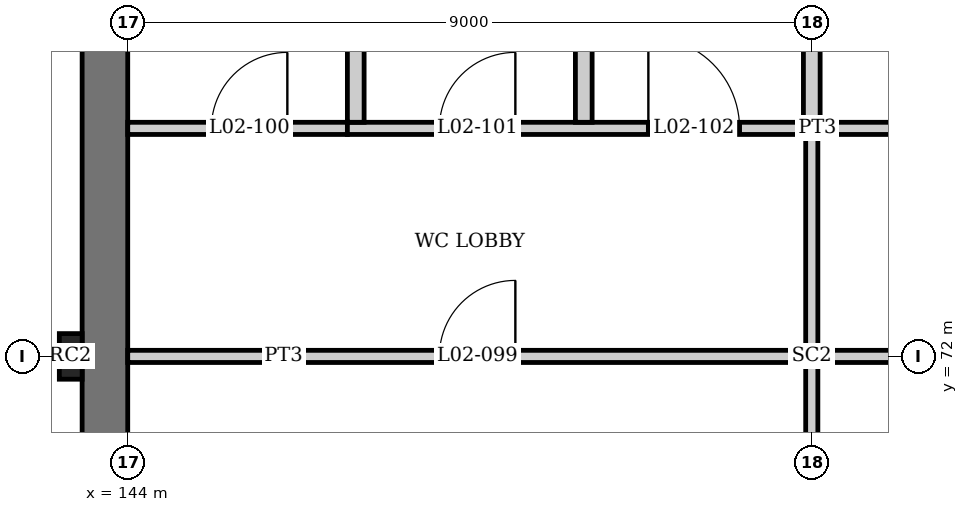
"""IFC4 building model, lengths in metres.
Left out: names, types, materials, properties, quantities, classifications, styles, units other than length and angle.
Written with IfcOpenShell. Run it as: python <this file> out.ifc"""

import sys

from ifc_helpers import new_model, si_unit, direction, frame, frame_2d, origin, origin_2d, place, context, subcontext, project, spatial, rectangle, i_section, extrude, element, fill, save


model = new_model("IFC4")
c1 = context("Model", 3, precision=1e-05, world=origin(), true_north=direction((0.0, 1.0)))
c2 = subcontext(c1, "Body", "Model", "MODEL_VIEW")
j1 = project(units=[si_unit("LENGTHUNIT", "METRE"), si_unit("PLANEANGLEUNIT", "RADIAN")], contexts=[c1])
p1 = place(None, origin())
s1 = spatial("IfcSite", under=j1, at=p1, CompositionType="ELEMENT")
p2 = place(p1, origin())
s2 = spatial("IfcBuilding", under=s1, at=p2, CompositionType="ELEMENT")
p3 = place(p2, frame((0.0, 0.0, 10.5)))
s3 = spatial("IfcBuildingStorey", under=s2, at=p3, CompositionType="ELEMENT", Elevation=10.5)
p4 = place(p3, frame((153.0, 72.0, 0.0), z_axis=(0.0, 0.0, 1.0), x_axis=(0.0, 1.0, 0.0)))
e1 = element("IfcColumn", 1, at=p4, inside=s3, PredefinedType="COLUMN", context=c2, shape_type="SweptSolid", body=[
    extrude(i_section(OverallWidth=0.256, OverallDepth=0.26, WebThickness=0.01, FlangeThickness=0.017, at=origin_2d()), origin(), (0.0, 0.0, 1.0), 4.5),
])
p5 = place(p3, frame((143.7, 54.0, 0.0), z_axis=(0.0, 0.0, 1.0), x_axis=(0.0, 1.0, 0.0)))
e2 = element("IfcWall", 2, at=p5, inside=s3, PredefinedType="SHEAR", context=c2, shape_type="SweptSolid", body=[
    extrude(rectangle(XDim=26.4, YDim=0.6, at=frame_2d((13.2, 0.0))), origin(), (0.0, 0.0, 1.0), 4.5),
])
p6 = place(p3, frame((143.25, 72.0, 0.0), z_axis=(0.0, 0.0, 1.0), x_axis=(0.0, 1.0, 0.0)))
e3 = element("IfcColumn", 3, at=p6, inside=s3, PredefinedType="PILASTER", context=c2, shape_type="SweptSolid", body=[
    extrude(rectangle(XDim=0.6, YDim=0.3, at=origin_2d()), origin(), (0.0, 0.0, 1.0), 4.5),
])
p7 = place(p3, frame((144.0, 72.0, 0.0), z_axis=(0.0, 0.0, 1.0), x_axis=(1.0, 0.0, 0.0)))
e4 = element("IfcWall", 4, at=p7, inside=s3, PredefinedType="PARTITIONING", context=c2, shape_type="SweptSolid", body=[
    extrude(rectangle(XDim=8.87, YDim=0.16, at=frame_2d((4.435, 0.0))), origin(), (0.0, 0.0, 1.0), 3.738),
])
p8 = place(p7, frame((4.1, 0.0, 0.0)))
e5 = element("IfcOpeningElement", 5, at=p8, cuts=e4, PredefinedType="OPENING", context=c2, shape_type="SweptSolid", body=[
    extrude(rectangle(XDim=1.0, YDim=2.1, at=frame_2d((0.5, 1.05))), frame((0.0, 0.09, 0.0), z_axis=(0.0, -1.0, 0.0), x_axis=(1.0, 0.0, 0.0)), (0.0, 0.0, 1.0), 0.18),
])
p9 = place(p3, frame((153.13, 72.0, 0.0), z_axis=(0.0, 0.0, 1.0), x_axis=(1.0, 0.0, 0.0)))
e6 = element("IfcWall", 6, at=p9, inside=s3, PredefinedType="PARTITIONING", context=c2, shape_type="SweptSolid", body=[
    extrude(rectangle(XDim=8.74, YDim=0.16, at=frame_2d((4.37, 0.0))), origin(), (0.0, 0.0, 1.0), 3.738),
])
p10 = place(p9, frame((3.97, 0.0, 0.0)))
e7 = element("IfcOpeningElement", 7, at=p10, cuts=e6, PredefinedType="OPENING", context=c2, shape_type="SweptSolid", body=[
    extrude(rectangle(XDim=1.0, YDim=2.1, at=frame_2d((0.5, 1.05))), frame((0.0, 0.09, 0.0), z_axis=(0.0, -1.0, 0.0), x_axis=(1.0, 0.0, 0.0)), (0.0, 0.0, 1.0), 0.18),
])
p11 = place(p3, frame((144.0, 75.0, 0.0), z_axis=(0.0, 0.0, 1.0), x_axis=(1.0, 0.0, 0.0)))
e8 = element("IfcWall", 8, at=p11, inside=s3, PredefinedType="PARTITIONING", context=c2, shape_type="SweptSolid", body=[
    extrude(rectangle(XDim=2.89, YDim=0.16, at=frame_2d((1.445, 0.0))), origin(), (0.0, 0.0, 1.0), 4.35),
])
p12 = place(p11, frame((1.1, 0.0, 0.0)))
e9 = element("IfcOpeningElement", 9, at=p12, cuts=e8, PredefinedType="OPENING", context=c2, shape_type="SweptSolid", body=[
    extrude(rectangle(XDim=1.0, YDim=2.1, at=frame_2d((0.5, 1.05))), frame((0.0, 0.09, 0.0), z_axis=(0.0, -1.0, 0.0), x_axis=(1.0, 0.0, 0.0)), (0.0, 0.0, 1.0), 0.18),
])
p13 = place(p3, frame((146.89, 75.0, 0.0), z_axis=(0.0, 0.0, 1.0), x_axis=(1.0, 0.0, 0.0)))
e10 = element("IfcWall", 10, at=p13, inside=s3, PredefinedType="PARTITIONING", context=c2, shape_type="SweptSolid", body=[
    extrude(rectangle(XDim=15.21, YDim=0.16, at=frame_2d((7.605, 0.0))), origin(), (0.0, 0.0, 1.0), 4.043),
])
p14 = place(p13, frame((1.21, 0.0, 0.0)))
e11 = element("IfcOpeningElement", 11, at=p14, cuts=e10, PredefinedType="OPENING", context=c2, shape_type="SweptSolid", body=[
    extrude(rectangle(XDim=1.0, YDim=2.1, at=frame_2d((0.5, 1.05))), frame((0.0, 0.09, 0.0), z_axis=(0.0, -1.0, 0.0), x_axis=(1.0, 0.0, 0.0)), (0.0, 0.0, 1.0), 0.18),
])
p15 = place(p13, frame((3.96, 0.0, 0.0)))
e12 = element("IfcOpeningElement", 12, at=p15, cuts=e10, PredefinedType="OPENING", context=c2, shape_type="SweptSolid", body=[
    extrude(rectangle(XDim=1.2, YDim=2.1, at=frame_2d((0.6, 1.05))), frame((0.0, 0.09, 0.0), z_axis=(0.0, -1.0, 0.0), x_axis=(1.0, 0.0, 0.0)), (0.0, 0.0, 1.0), 0.18),
])
p16 = place(p13, frame((7.21, 0.0, 0.0)))
e13 = element("IfcOpeningElement", 13, at=p16, cuts=e10, PredefinedType="OPENING", context=c2, shape_type="SweptSolid", body=[
    extrude(rectangle(XDim=1.0, YDim=2.1, at=frame_2d((0.5, 1.05))), frame((0.0, 0.09, 0.0), z_axis=(0.0, -1.0, 0.0), x_axis=(1.0, 0.0, 0.0)), (0.0, 0.0, 1.0), 0.18),
])
p17 = place(p13, frame((10.21, 0.0, 0.0)))
e14 = element("IfcOpeningElement", 14, at=p17, cuts=e10, PredefinedType="OPENING", context=c2, shape_type="SweptSolid", body=[
    extrude(rectangle(XDim=1.0, YDim=2.1, at=frame_2d((0.5, 1.05))), frame((0.0, 0.09, 0.0), z_axis=(0.0, -1.0, 0.0), x_axis=(1.0, 0.0, 0.0)), (0.0, 0.0, 1.0), 0.18),
])
p18 = place(p13, frame((12.96, 0.0, 0.0)))
e15 = element("IfcOpeningElement", 15, at=p18, cuts=e10, PredefinedType="OPENING", context=c2, shape_type="SweptSolid", body=[
    extrude(rectangle(XDim=1.2, YDim=2.1, at=frame_2d((0.6, 1.05))), frame((0.0, 0.09, 0.0), z_axis=(0.0, -1.0, 0.0), x_axis=(1.0, 0.0, 0.0)), (0.0, 0.0, 1.0), 0.18),
])
for number, where, z_axis, x_axis in (
    (16, (147.0, 75.08, 0.0), (0.0, 0.0, 1.0), (0.0, 1.0, 0.0)),
    (17, (150.0, 75.08, 0.0), (0.0, 0.0, 1.0), (0.0, 1.0, 0.0)),
):
    element("IfcWall", number, at=place(p3, frame(where, z_axis=z_axis, x_axis=x_axis)), inside=s3, PredefinedType="PLUMBINGWALL", context=c2, shape_type="SweptSolid", body=[
        extrude(rectangle(XDim=5.32, YDim=0.22, at=frame_2d((2.66, 0.0))), origin(), (0.0, 0.0, 1.0), 4.35),
    ])
p19 = place(p3, frame((153.0, 54.0, 0.0), z_axis=(0.0, 0.0, 1.0), x_axis=(0.0, 1.0, 0.0)))
e18 = element("IfcWall", 18, at=p19, inside=s3, PredefinedType="PARTITIONING", context=c2, shape_type="SweptSolid", body=[
    extrude(rectangle(XDim=17.87, YDim=0.16, at=frame_2d((8.935, 0.0))), origin(), (0.0, 0.0, 1.0), 3.65),
])
p20 = place(p19, frame((1.35, 0.0, 0.0)))
e19 = element("IfcOpeningElement", 19, at=p20, cuts=e18, PredefinedType="OPENING", context=c2, shape_type="SweptSolid", body=[
    extrude(rectangle(XDim=1.8, YDim=2.1, at=frame_2d((0.9, 1.05))), frame((0.0, 0.09, 0.0), z_axis=(0.0, -1.0, 0.0), x_axis=(1.0, 0.0, 0.0)), (0.0, 0.0, 1.0), 0.18),
])
p21 = place(p19, frame((14.85, 0.0, 0.0)))
e20 = element("IfcOpeningElement", 20, at=p21, cuts=e18, PredefinedType="OPENING", context=c2, shape_type="SweptSolid", body=[
    extrude(rectangle(XDim=1.8, YDim=2.1, at=frame_2d((0.9, 1.05))), frame((0.0, 0.09, 0.0), z_axis=(0.0, -1.0, 0.0), x_axis=(1.0, 0.0, 0.0)), (0.0, 0.0, 1.0), 0.18),
])
p22 = place(p3, frame((153.0, 72.13, 0.0), z_axis=(0.0, 0.0, 1.0), x_axis=(0.0, 1.0, 0.0)))
e21 = element("IfcWall", 21, at=p22, inside=s3, PredefinedType="PARTITIONING", context=c2, shape_type="SweptSolid", body=[
    extrude(rectangle(XDim=2.79, YDim=0.16, at=frame_2d((1.395, 0.0))), origin(), (0.0, 0.0, 1.0), 4.043),
])
p23 = place(p3, frame((153.0, 75.08, 0.0), z_axis=(0.0, 0.0, 1.0), x_axis=(0.0, 1.0, 0.0)))
e22 = element("IfcWall", 22, at=p23, inside=s3, PredefinedType="PLUMBINGWALL", context=c2, shape_type="SweptSolid", body=[
    extrude(rectangle(XDim=5.32, YDim=0.22, at=frame_2d((2.66, 0.0))), origin(), (0.0, 0.0, 1.0), 4.043),
])
p24 = place(p8, origin())
e23 = element("IfcDoor", 23, at=p24, inside=s3, OperationType="SINGLE_SWING_RIGHT", PredefinedType="DOOR", context=c2, shape_type="SweptSolid", body=[
    extrude(rectangle(XDim=1.0, YDim=2.1, at=frame_2d((0.5, 1.05))), frame((0.0, 0.025, 0.0), z_axis=(0.0, -1.0, 0.0), x_axis=(1.0, 0.0, 0.0)), (0.0, 0.0, 1.0), 0.05),
])
fill(e5, e23)
p25 = place(p12, origin())
e24 = element("IfcDoor", 24, at=p25, inside=s3, OperationType="SINGLE_SWING_RIGHT", PredefinedType="DOOR", context=c2, shape_type="SweptSolid", body=[
    extrude(rectangle(XDim=1.0, YDim=2.1, at=frame_2d((0.5, 1.05))), frame((0.0, 0.025, 0.0), z_axis=(0.0, -1.0, 0.0), x_axis=(1.0, 0.0, 0.0)), (0.0, 0.0, 1.0), 0.05),
])
fill(e9, e24)
p26 = place(p14, origin())
e25 = element("IfcDoor", 25, at=p26, inside=s3, OperationType="SINGLE_SWING_RIGHT", PredefinedType="DOOR", context=c2, shape_type="SweptSolid", body=[
    extrude(rectangle(XDim=1.0, YDim=2.1, at=frame_2d((0.5, 1.05))), frame((0.0, 0.025, 0.0), z_axis=(0.0, -1.0, 0.0), x_axis=(1.0, 0.0, 0.0)), (0.0, 0.0, 1.0), 0.05),
])
fill(e11, e25)
p27 = place(p15, origin())
e26 = element("IfcDoor", 26, at=p27, inside=s3, OperationType="SINGLE_SWING_LEFT", PredefinedType="DOOR", context=c2, shape_type="SweptSolid", body=[
    extrude(rectangle(XDim=1.2, YDim=2.1, at=frame_2d((0.6, 1.05))), frame((0.0, 0.025, 0.0), z_axis=(0.0, -1.0, 0.0), x_axis=(1.0, 0.0, 0.0)), (0.0, 0.0, 1.0), 0.05),
])
fill(e12, e26)
save(model, sys.argv[1])
